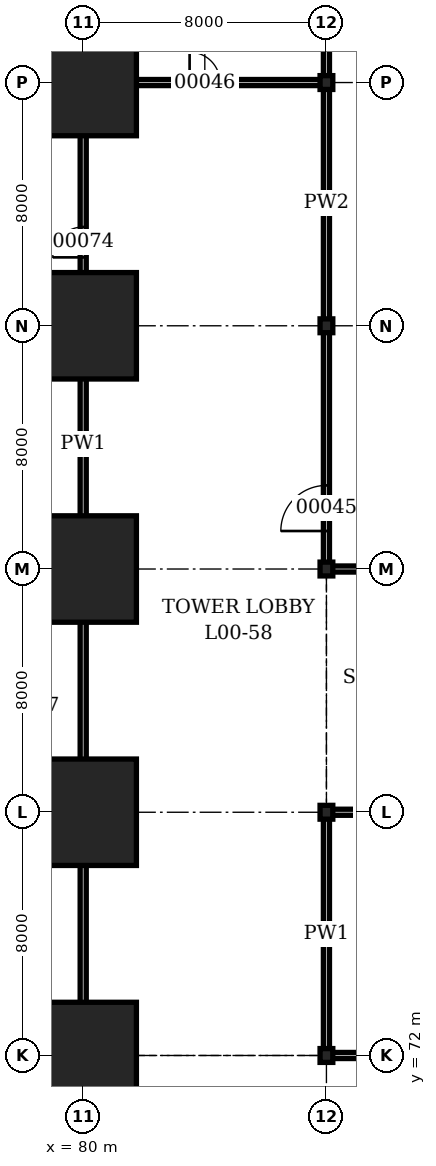
"""IFC4 building model, lengths in metres.
Left out: names, types, materials, properties, quantities, classifications, styles, units other than length and angle.
Written with IfcOpenShell. Run it as: python <this file> out.ifc"""

import sys

from ifc_helpers import new_model, si_unit, direction, frame, frame_2d, origin, origin_2d, place, context, subcontext, project, spatial, rectangle, hollow_rectangle, i_section, extrude, element, fill, save


model = new_model("IFC4")
c1 = context("Model", 3, precision=1e-05, world=origin(), true_north=direction((0.0, 1.0)))
c2 = subcontext(c1, "Body", "Model", "MODEL_VIEW")
j1 = project(units=[si_unit("LENGTHUNIT", "METRE"), si_unit("PLANEANGLEUNIT", "RADIAN")], contexts=[c1])
p1 = place(None, origin())
s1 = spatial("IfcSite", under=j1, at=p1, CompositionType="ELEMENT")
p2 = place(p1, origin())
s2 = spatial("IfcBuilding", under=s1, at=p2, CompositionType="ELEMENT")
p3 = place(p2, origin())
s3 = spatial("IfcBuildingStorey", under=s2, at=p3, CompositionType="ELEMENT", Elevation=0.0)
for number, where, z_axis, x_axis in (
    (1, (80.0, 72.0, 0.0), (0.0, 0.0, 1.0), (1.0, 0.0, 0.0)),
    (2, (80.0, 80.0, 0.0), (0.0, 0.0, 1.0), (1.0, 0.0, 0.0)),
    (3, (80.0, 88.0, 0.0), (0.0, 0.0, 1.0), (1.0, 0.0, 0.0)),
    (4, (80.0, 96.0, 0.0), (0.0, 0.0, 1.0), (1.0, 0.0, 0.0)),
    (5, (80.0, 104.0, 0.0), (0.0, 0.0, 1.0), (1.0, 0.0, 0.0)),
):
    element("IfcColumn", number, at=place(p3, frame(where, z_axis=z_axis, x_axis=x_axis)), inside=s3, PredefinedType="COLUMN", context=c2, shape_type="SweptSolid", body=[
        extrude(hollow_rectangle(XDim=3.5, YDim=3.5, WallThickness=0.5, at=origin_2d()), origin(), (0.0, 0.0, 1.0), 4.9),
    ])
for number, where, z_axis, x_axis in (
    (6, (88.0, 72.0, 0.0), (0.0, 0.0, 1.0), (1.0, 0.0, 0.0)),
    (7, (88.0, 80.0, 0.0), (0.0, 0.0, 1.0), (1.0, 0.0, 0.0)),
    (8, (88.0, 88.0, 0.0), (0.0, 0.0, 1.0), (1.0, 0.0, 0.0)),
    (9, (88.0, 96.0, 0.0), (0.0, 0.0, 1.0), (1.0, 0.0, 0.0)),
    (10, (88.0, 104.0, 0.0), (0.0, 0.0, 1.0), (1.0, 0.0, 0.0)),
):
    element("IfcColumn", number, at=place(p3, frame(where, z_axis=z_axis, x_axis=x_axis)), inside=s3, PredefinedType="COLUMN", context=c2, shape_type="SweptSolid", body=[
        extrude(i_section(OverallWidth=0.419, OverallDepth=0.455, WebThickness=0.042, FlangeThickness=0.068, at=origin_2d()), origin(), (0.0, 0.0, 1.0), 4.9),
    ])
p4 = place(p3, frame((72.1, 72.0, 0.0), z_axis=(0.0, 0.0, 1.0), x_axis=(1.0, 0.0, 0.0)))
e11 = element("IfcWall", 11, at=p4, inside=s3, PredefinedType="PARTITIONING", context=c2, shape_type="SweptSolid", body=[
    extrude(rectangle(XDim=7.8, YDim=0.2, at=frame_2d((3.9, 0.0))), origin(), (0.0, 0.0, 1.0), 3.928),
])
p5 = place(p3, frame((88.1, 72.0, 0.0), z_axis=(0.0, 0.0, 1.0), x_axis=(1.0, 0.0, 0.0)))
e12 = element("IfcWall", 12, at=p5, inside=s3, PredefinedType="PARTITIONING", context=c2, shape_type="SweptSolid", body=[
    extrude(rectangle(XDim=15.8, YDim=0.2, at=frame_2d((7.9, 0.0))), origin(), (0.0, 0.0, 1.0), 3.928),
])
p6 = place(p3, frame((88.1, 80.0, 0.0), z_axis=(0.0, 0.0, 1.0), x_axis=(1.0, 0.0, 0.0)))
e13 = element("IfcWall", 13, at=p6, inside=s3, PredefinedType="PARTITIONING", context=c2, shape_type="SweptSolid", body=[
    extrude(rectangle(XDim=7.9, YDim=0.2, at=frame_2d((3.95, 0.0))), origin(), (0.0, 0.0, 1.0), 3.928),
])
p7 = place(p6, frame((1.4, 0.0, 0.0)))
e14 = element("IfcOpeningElement", 14, at=p7, cuts=e13, PredefinedType="OPENING", context=c2, shape_type="SweptSolid", body=[
    extrude(rectangle(XDim=1.0, YDim=2.1, at=frame_2d((0.5, 1.05))), frame((0.0, 0.11, 0.0), z_axis=(0.0, -1.0, 0.0), x_axis=(1.0, 0.0, 0.0)), (0.0, 0.0, 1.0), 0.22),
])
p8 = place(p3, frame((88.1, 88.0, 0.0), z_axis=(0.0, 0.0, 1.0), x_axis=(1.0, 0.0, 0.0)))
e15 = element("IfcWall", 15, at=p8, inside=s3, PredefinedType="PARTITIONING", context=c2, shape_type="SweptSolid", body=[
    extrude(rectangle(XDim=15.8, YDim=0.2, at=frame_2d((7.9, 0.0))), origin(), (0.0, 0.0, 1.0), 3.928),
])
p9 = place(p3, frame((72.1, 95.0, 0.0), z_axis=(0.0, 0.0, 1.0), x_axis=(1.0, 0.0, 0.0)))
e16 = element("IfcWall", 16, at=p9, inside=s3, PredefinedType="PARTITIONING", context=c2, shape_type="SweptSolid", body=[
    extrude(rectangle(XDim=7.8, YDim=0.2, at=frame_2d((3.9, 0.0))), origin(), (0.0, 0.0, 1.0), 4.7),
])
p10 = place(p3, frame((80.1, 104.0, 0.0), z_axis=(0.0, 0.0, 1.0), x_axis=(1.0, 0.0, 0.0)))
e17 = element("IfcWall", 17, at=p10, inside=s3, PredefinedType="PARTITIONING", context=c2, shape_type="SweptSolid", body=[
    extrude(rectangle(XDim=7.8, YDim=0.2, at=frame_2d((3.9, 0.0))), origin(), (0.0, 0.0, 1.0), 3.928),
])
p11 = place(p10, frame((3.4, 0.0, 0.0)))
e18 = element("IfcOpeningElement", 18, at=p11, cuts=e17, PredefinedType="OPENING", context=c2, shape_type="SweptSolid", body=[
    extrude(rectangle(XDim=1.0, YDim=2.1, at=frame_2d((0.5, 1.05))), frame((0.0, 0.11, 0.0), z_axis=(0.0, -1.0, 0.0), x_axis=(1.0, 0.0, 0.0)), (0.0, 0.0, 1.0), 0.22),
])
p12 = place(p3, frame((80.0, 72.1, 0.0), z_axis=(0.0, 0.0, 1.0), x_axis=(0.0, 1.0, 0.0)))
e19 = element("IfcWall", 19, at=p12, inside=s3, PredefinedType="PARTITIONING", context=c2, shape_type="SweptSolid", body=[
    extrude(rectangle(XDim=40.05, YDim=0.2, at=frame_2d((20.025, 0.0))), origin(), (0.0, 0.0, 1.0), 3.928),
])
p13 = place(p12, frame((26.15, 0.0, 0.0)))
e20 = element("IfcOpeningElement", 20, at=p13, cuts=e19, PredefinedType="OPENING", context=c2, shape_type="SweptSolid", body=[
    extrude(rectangle(XDim=1.0, YDim=2.1, at=frame_2d((0.5, 1.05))), frame((0.0, 0.11, 0.0), z_axis=(0.0, -1.0, 0.0), x_axis=(1.0, 0.0, 0.0)), (0.0, 0.0, 1.0), 0.22),
])
p14 = place(p3, frame((88.0, 72.1, 0.0), z_axis=(0.0, 0.0, 1.0), x_axis=(0.0, 1.0, 0.0)))
e21 = element("IfcWall", 21, at=p14, inside=s3, PredefinedType="PARTITIONING", context=c2, shape_type="SweptSolid", body=[
    extrude(rectangle(XDim=7.8, YDim=0.2, at=frame_2d((3.9, 0.0))), origin(), (0.0, 0.0, 1.0), 3.928),
])
p15 = place(p3, frame((88.0, 88.1, 0.0), z_axis=(0.0, 0.0, 1.0), x_axis=(0.0, 1.0, 0.0)))
e22 = element("IfcWall", 22, at=p15, inside=s3, PredefinedType="PARTITIONING", context=c2, shape_type="SweptSolid", body=[
    extrude(rectangle(XDim=23.9, YDim=0.2, at=frame_2d((11.95, 0.0))), origin(), (0.0, 0.0, 1.0), 3.928),
])
p16 = place(p15, frame((1.15, 0.0, 0.0)))
e23 = element("IfcOpeningElement", 23, at=p16, cuts=e22, PredefinedType="OPENING", context=c2, shape_type="SweptSolid", body=[
    extrude(rectangle(XDim=1.5, YDim=2.4, at=frame_2d((0.75, 1.2))), frame((0.0, 0.11, 0.0), z_axis=(0.0, -1.0, 0.0), x_axis=(1.0, 0.0, 0.0)), (0.0, 0.0, 1.0), 0.22),
])
p17 = place(p16, origin())
e24 = element("IfcDoor", 24, at=p17, inside=s3, OperationType="DOUBLE_DOOR_SINGLE_SWING", PredefinedType="DOOR", context=c2, shape_type="SweptSolid", body=[
    extrude(rectangle(XDim=1.5, YDim=2.4, at=frame_2d((0.75, 1.2))), frame((0.0, 0.1, 0.0), z_axis=(0.0, -1.0, 0.0), x_axis=(1.0, 0.0, 0.0)), (0.0, 0.0, 1.0), 0.199),
])
fill(e23, e24)
p18 = place(p11, origin())
e25 = element("IfcDoor", 25, at=p18, inside=s3, OperationType="SINGLE_SWING_LEFT", PredefinedType="DOOR", context=c2, shape_type="SweptSolid", body=[
    extrude(rectangle(XDim=1.0, YDim=2.1, at=frame_2d((0.5, 1.05))), frame((0.0, 0.1, 0.0), z_axis=(0.0, -1.0, 0.0), x_axis=(1.0, 0.0, 0.0)), (0.0, 0.0, 1.0), 0.199),
])
fill(e18, e25)
p19 = place(p13, origin())
e26 = element("IfcDoor", 26, at=p19, inside=s3, OperationType="SINGLE_SWING_LEFT", PredefinedType="DOOR", context=c2, shape_type="SweptSolid", body=[
    extrude(rectangle(XDim=1.0, YDim=2.1, at=frame_2d((0.5, 1.05))), frame((0.0, 0.1, 0.0), z_axis=(0.0, -1.0, 0.0), x_axis=(1.0, 0.0, 0.0)), (0.0, 0.0, 1.0), 0.199),
])
fill(e20, e26)
save(model, sys.argv[1])
